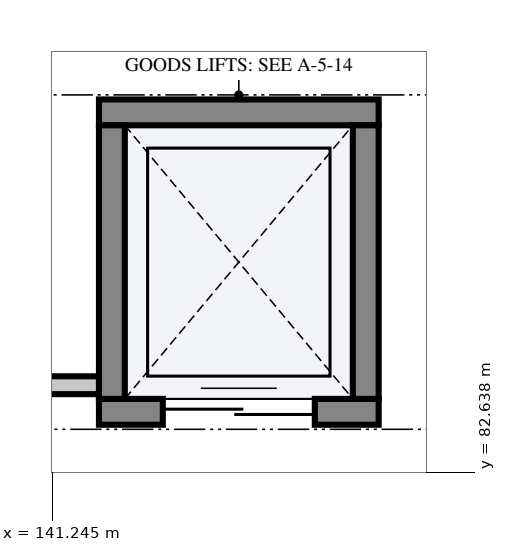
"""IFC4 building model, lengths in metres.
Left out: names, types, materials, properties, quantities, classifications, styles, units other than length and angle.
Written with IfcOpenShell. Run it as: python <this file> out.ifc"""

import sys

from ifc_helpers import new_model, si_unit, direction, frame, frame_2d, origin, place, context, subcontext, project, spatial, rectangle, extrude, element, fill, save


model = new_model("IFC4")
c1 = context("Model", 3, precision=1e-05, world=origin(), true_north=direction((0.0, 1.0)))
c2 = subcontext(c1, "Body", "Model", "MODEL_VIEW")
j1 = project(units=[si_unit("LENGTHUNIT", "METRE"), si_unit("PLANEANGLEUNIT", "RADIAN")], contexts=[c1])
p1 = place(None, origin())
s1 = spatial("IfcSite", under=j1, at=p1, CompositionType="ELEMENT")
p2 = place(p1, origin())
s2 = spatial("IfcBuilding", under=s1, at=p2, CompositionType="ELEMENT")
p3 = place(p2, frame((0.0, 0.0, 10.2)))
s3 = spatial("IfcBuildingStorey", under=s2, at=p3, CompositionType="ELEMENT", Elevation=10.2)
p4 = place(p3, frame((141.86, 83.43, 0.0), z_axis=(0.0, 0.0, 1.0), x_axis=(1.0, 0.0, 0.0)))
e1 = element("IfcWall", 1, at=p4, inside=s3, PredefinedType="SHEAR", context=c2, shape_type="SweptSolid", body=[
    extrude(rectangle(XDim=3.68, YDim=0.34, at=frame_2d((1.84, 0.0))), origin(), (0.0, 0.0, 1.0), 4.515),
])
p5 = place(p4, frame((0.84, 0.0, 0.0)))
e2 = element("IfcOpeningElement", 2, at=p5, cuts=e1, PredefinedType="OPENING", context=c2, shape_type="SweptSolid", body=[
    extrude(rectangle(XDim=2.0, YDim=2.4, at=frame_2d((1.0, 1.2))), frame((0.0, 0.182, 0.0), z_axis=(0.0, -1.0, 0.0), x_axis=(1.0, 0.0, 0.0)), (0.0, 0.0, 1.0), 0.364),
])
p6 = place(p3, frame((141.86, 87.37, 0.0), z_axis=(0.0, 0.0, 1.0), x_axis=(1.0, 0.0, 0.0)))
e3 = element("IfcWall", 3, at=p6, inside=s3, PredefinedType="SHEAR", context=c2, shape_type="SweptSolid", body=[
    extrude(rectangle(XDim=3.68, YDim=0.34, at=frame_2d((1.84, 0.0))), origin(), (0.0, 0.0, 1.0), 4.515),
])
for number, where, z_axis, x_axis in (
    (4, (142.03, 83.6, 0.0), (0.0, 0.0, 1.0), (0.0, 1.0, 0.0)),
    (5, (145.37, 83.6, 0.0), (0.0, 0.0, 1.0), (0.0, 1.0, 0.0)),
):
    element("IfcWall", number, at=place(p3, frame(where, z_axis=z_axis, x_axis=x_axis)), inside=s3, PredefinedType="SHEAR", context=c2, shape_type="SweptSolid", body=[
        extrude(rectangle(XDim=3.6, YDim=0.34, at=frame_2d((1.8, 0.0))), origin(), (0.0, 0.0, 1.0), 4.515),
    ])
p7 = place(p3, frame((141.86, 83.78, 0.0), z_axis=(0.0, 0.0, 1.0), x_axis=(-1.0, 0.0, 0.0)))
e6 = element("IfcWall", 6, at=p7, inside=s3, PredefinedType="PARTITIONING", context=c2, shape_type="SweptSolid", body=[
    extrude(rectangle(XDim=5.32, YDim=0.235, at=frame_2d((2.66, 0.0))), origin(), (0.0, 0.0, 1.0), 3.455),
])
p8 = place(p5, origin())
e7 = element("IfcDoor", 7, at=p8, inside=s3, OperationType="DOUBLE_DOOR_SLIDING", PredefinedType="DOOR", context=c2, shape_type="SweptSolid", body=[
    extrude(rectangle(XDim=2.0, YDim=2.4, at=frame_2d((1.0, 1.2))), frame((0.0, 0.025, 0.0), z_axis=(0.0, -1.0, 0.0), x_axis=(1.0, 0.0, 0.0)), (0.0, 0.0, 1.0), 0.05),
])
fill(e2, e7)
save(model, sys.argv[1])
